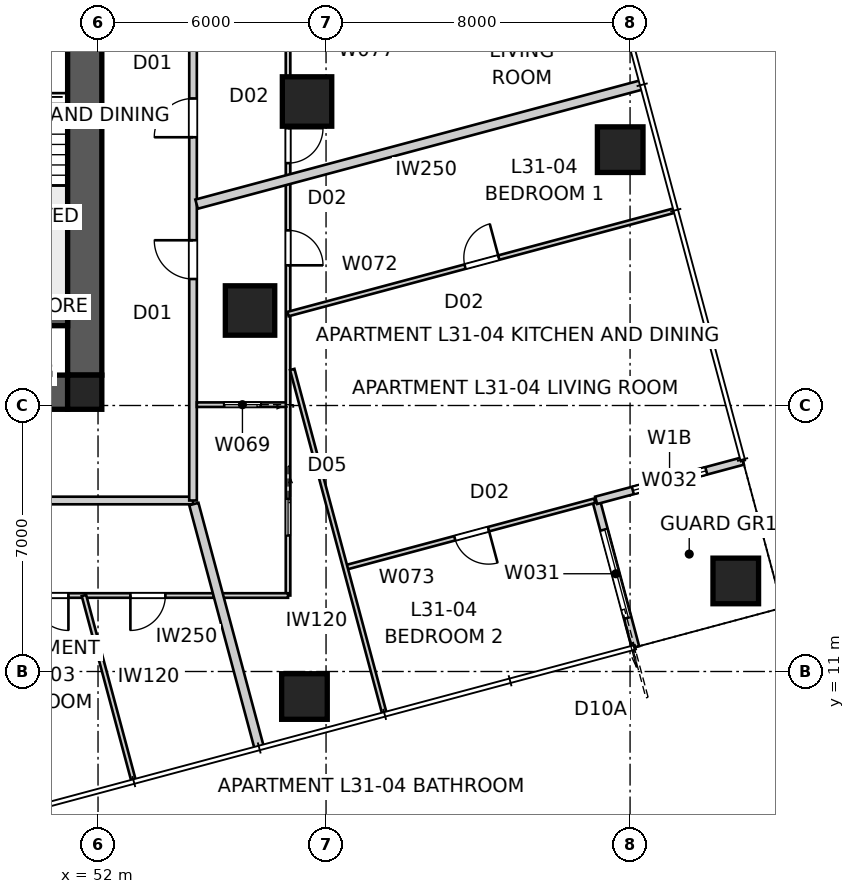
"""IFC4 building model, lengths in metres.
Left out: names, types, materials, properties, quantities, classifications, styles, units other than length and angle.
Written with IfcOpenShell. Run it as: python <this file> out.ifc"""

import sys

from ifc_helpers import new_model, si_unit, direction, frame, frame_2d, origin, origin_2d, place, context, subcontext, project, spatial, polyline, rectangle, outline, extrude, element, fill, save


model = new_model("IFC4")
c1 = context("Model", 3, precision=1e-05, world=origin(), true_north=direction((0.0, 1.0)))
c2 = subcontext(c1, "Body", "Model", "MODEL_VIEW")
j1 = project(units=[si_unit("LENGTHUNIT", "METRE"), si_unit("PLANEANGLEUNIT", "RADIAN")], contexts=[c1])
p1 = place(None, origin())
s1 = spatial("IfcSite", under=j1, at=p1, CompositionType="ELEMENT")
p2 = place(p1, origin())
s2 = spatial("IfcBuilding", under=s1, at=p2, CompositionType="ELEMENT")
p3 = place(p2, frame((0.0, 0.0, 115.0)))
s3 = spatial("IfcBuildingStorey", under=s2, at=p3, CompositionType="ELEMENT", Elevation=115.0)
p4 = place(p3, frame((51.2, 18.35, 0.0), z_axis=(0.0, 0.0, 1.0), x_axis=(-1.0, 0.0, 0.0)))
e1 = element("IfcWall", 1, at=p4, inside=s3, PredefinedType="SHEAR", context=c2, shape_type="SweptSolid", body=[
    extrude(outline(polyline([(0.0, -0.45), (22.4, -0.45), (22.4, -0.025), (22.85, -0.025), (22.85, 0.025), (22.4, 0.025), (22.4, 0.45), (0.0, 0.45), (0.0, 0.025), (-0.45, 0.025), (-0.45, -0.025), (0.0, -0.025), (0.0, -0.45)])), origin(), (0.0, 0.0, 1.0), 3.4),
])
p5 = place(p3, frame((51.65, 18.8, 0.0), z_axis=(0.0, 0.0, 1.0), x_axis=(0.0, 1.0, 0.0)))
e2 = element("IfcWall", 2, at=p5, inside=s3, PredefinedType="SHEAR", context=c2, shape_type="SweptSolid", body=[
    extrude(outline(polyline([(0.0, -0.45), (22.4, -0.45), (22.4, -0.025), (22.85, -0.025), (22.85, 0.025), (22.4, 0.025), (22.4, 0.45), (0.0, 0.45), (0.0, 0.025), (-0.45, 0.025), (-0.45, -0.025), (0.0, -0.025), (0.0, -0.45)])), origin(), (0.0, 0.0, 1.0), 3.4),
])
p6 = place(p5, frame((11.14, 0.0, 0.0)))
e3 = element("IfcOpeningElement", 3, at=p6, cuts=e2, PredefinedType="OPENING", context=c2, shape_type="SweptSolid", body=[
    extrude(rectangle(XDim=1.02, YDim=2.4, at=frame_2d((0.51, 1.2))), frame((0.0, 0.46, 0.0), z_axis=(0.0, -1.0, 0.0), x_axis=(1.0, 0.0, 0.0)), (0.0, 0.0, 1.0), 0.92),
])
p7 = place(p3, frame((51.2, 20.25, 0.0), z_axis=(0.0, 0.0, 1.0), x_axis=(-1.0, 0.0, 0.0)))
e4 = element("IfcWall", 4, at=p7, inside=s3, PredefinedType="SHEAR", context=c2, shape_type="SweptSolid", body=[
    extrude(rectangle(XDim=3.5, YDim=0.3, at=frame_2d((1.75, 0.0))), origin(), (0.0, 0.0, 1.0), 3.4),
])
p8 = place(p3, frame((51.65, 18.35, 0.0), z_axis=(0.0, 0.0, 1.0), x_axis=(1.0, 0.0, 0.0)))
e5 = element("IfcColumn", 5, at=p8, inside=s3, PredefinedType="COLUMN", context=c2, shape_type="SweptSolid", body=[
    extrude(rectangle(XDim=0.9, YDim=0.9, at=origin_2d()), origin(), (0.0, 0.0, 1.0), 3.4),
])
for number, where, z_axis, x_axis in (
    (6, (57.432, 10.342, 0.0), (0.0, 0.0, 1.0), (1.0, 0.0, 0.0)),
    (7, (68.781, 13.383, 0.0), (0.0, 0.0, 1.0), (1.0, 0.0, 0.0)),
    (8, (65.74, 24.733, 0.0), (0.0, 0.0, 1.0), (1.0, 0.0, 0.0)),
):
    element("IfcColumn", number, at=place(p3, frame(where, z_axis=z_axis, x_axis=x_axis)), inside=s3, PredefinedType="COLUMN", context=c2, shape_type="SweptSolid", body=[
        extrude(rectangle(XDim=1.2, YDim=1.2, at=origin_2d()), origin(), (0.0, 0.0, 1.0), 3.4),
    ])
for number, where, z_axis, x_axis in (
    (9, (57.5, 26.0, 0.0), (0.0, 0.0, 1.0), (1.0, 0.0, 0.0)),
    (10, (56.0, 20.5, 0.0), (0.0, 0.0, 1.0), (1.0, 0.0, 0.0)),
):
    element("IfcColumn", number, at=place(p3, frame(where, z_axis=z_axis, x_axis=x_axis)), inside=s3, PredefinedType="COLUMN", context=c2, shape_type="SweptSolid", body=[
        extrude(rectangle(XDim=1.3, YDim=1.3, at=origin_2d()), origin(), (0.0, 0.0, 1.0), 3.4),
    ])
p9 = place(p3, frame((66.143, 11.641, 0.0), z_axis=(0.0, 0.0, 1.0), x_axis=(-0.258843877716, 0.965919172068, 0.0)))
e11 = element("IfcWall", 11, at=p9, inside=s3, PredefinedType="SOLIDWALL", context=c2, shape_type="SweptSolid", body=[
    extrude(rectangle(XDim=4.0, YDim=0.2, at=frame_2d((2.0, 0.0))), origin(), (0.0, 0.0, 1.0), 3.25),
])
p10 = place(p9, frame((0.8, 0.0, 0.0)))
e12 = element("IfcOpeningElement", 12, at=p10, cuts=e11, PredefinedType="OPENING", context=c2, shape_type="SweptSolid", body=[
    extrude(rectangle(XDim=2.4, YDim=2.1, at=frame_2d((1.2, 1.05))), frame((0.0, 0.11, 0.0), z_axis=(0.0, -1.0, 0.0), x_axis=(1.0, 0.0, 0.0)), (0.0, 0.0, 1.0), 0.22),
])
p11 = place(p3, frame((65.107, 15.504, 0.0), z_axis=(0.0, 0.0, 1.0), x_axis=(0.965934430412, 0.258786931944, 0.0)))
e13 = element("IfcWall", 13, at=p11, inside=s3, PredefinedType="SOLIDWALL", context=c2, shape_type="SweptSolid", body=[
    extrude(rectangle(XDim=4.0, YDim=0.2, at=frame_2d((2.0, 0.0))), origin(), (0.0, 0.0, 1.0), 3.25),
])
p12 = place(p11, frame((1.0, 0.0, 0.45)))
e14 = element("IfcOpeningElement", 14, at=p12, cuts=e13, PredefinedType="OPENING", context=c2, shape_type="SweptSolid", body=[
    extrude(rectangle(XDim=2.0, YDim=1.8, at=frame_2d((1.0, 0.9))), frame((0.0, 0.11, 0.0), z_axis=(0.0, -1.0, 0.0), x_axis=(1.0, 0.0, 0.0)), (0.0, 0.0, 1.0), 0.22),
])
p13 = place(p3, frame((26.3, 15.5, 0.0), z_axis=(0.0, 0.0, 1.0), x_axis=(1.0, 0.0, 0.0)))
e15 = element("IfcWall", 15, at=p13, inside=s3, PredefinedType="PARTITIONING", context=c2, shape_type="SweptSolid", body=[
    extrude(rectangle(XDim=28.2, YDim=0.2, at=frame_2d((14.1, 0.0))), origin(), (0.0, 0.0, 1.0), 3.25),
])
p14 = place(p13, frame((21.474, 0.0, 0.0)))
e16 = element("IfcOpeningElement", 16, at=p14, cuts=e15, PredefinedType="OPENING", context=c2, shape_type="SweptSolid", body=[
    extrude(rectangle(XDim=1.02, YDim=2.34, at=frame_2d((0.51, 1.17))), frame((0.0, 0.11, 0.0), z_axis=(0.0, -1.0, 0.0), x_axis=(1.0, 0.0, 0.0)), (0.0, 0.0, 1.0), 0.22),
])
p15 = place(p13, frame((1.353, 0.0, 0.0)))
e17 = element("IfcOpeningElement", 17, at=p15, cuts=e15, PredefinedType="OPENING", context=c2, shape_type="SweptSolid", body=[
    extrude(rectangle(XDim=1.02, YDim=2.1, at=frame_2d((0.51, 1.05))), frame((0.0, 0.11, 0.0), z_axis=(0.0, -1.0, 0.0), x_axis=(1.0, 0.0, 0.0)), (0.0, 0.0, 1.0), 0.22),
])
p16 = place(p3, frame((54.5, 15.5, 0.0), z_axis=(0.0, 0.0, 1.0), x_axis=(0.0, 1.0, 0.0)))
e18 = element("IfcWall", 18, at=p16, inside=s3, PredefinedType="PARTITIONING", context=c2, shape_type="SweptSolid", body=[
    extrude(rectangle(XDim=29.0, YDim=0.2, at=frame_2d((14.5, 0.0))), origin(), (0.0, 0.0, 1.0), 3.25),
])
p17 = place(p16, frame((24.76, 0.0, 0.0)))
e19 = element("IfcOpeningElement", 19, at=p17, cuts=e18, PredefinedType="OPENING", context=c2, shape_type="SweptSolid", body=[
    extrude(rectangle(XDim=1.02, YDim=2.1, at=frame_2d((0.51, 1.05))), frame((0.0, 0.11, 0.0), z_axis=(0.0, -1.0, 0.0), x_axis=(1.0, 0.0, 0.0)), (0.0, 0.0, 1.0), 0.22),
])
p18 = place(p16, frame((5.829, 0.0, 0.0)))
e20 = element("IfcOpeningElement", 20, at=p18, cuts=e18, PredefinedType="OPENING", context=c2, shape_type="SweptSolid", body=[
    extrude(rectangle(XDim=1.02, YDim=2.34, at=frame_2d((0.51, 1.17))), frame((0.0, 0.11, 0.0), z_axis=(0.0, -1.0, 0.0), x_axis=(1.0, 0.0, 0.0)), (0.0, 0.0, 1.0), 0.22),
])
p19 = place(p16, frame((9.559, 0.0, 0.0)))
e21 = element("IfcOpeningElement", 21, at=p19, cuts=e18, PredefinedType="OPENING", context=c2, shape_type="SweptSolid", body=[
    extrude(rectangle(XDim=1.02, YDim=2.34, at=frame_2d((0.51, 1.17))), frame((0.0, 0.11, 0.0), z_axis=(0.0, -1.0, 0.0), x_axis=(1.0, 0.0, 0.0)), (0.0, 0.0, 1.0), 0.22),
])
p20 = place(p3, frame((56.242, 8.988, 0.0), z_axis=(0.0, 0.0, 1.0), x_axis=(-0.25880587229, 0.965929355837, 0.0)))
e22 = element("IfcWall", 22, at=p20, inside=s3, PredefinedType="PARTITIONING", context=c2, shape_type="SweptSolid", body=[
    extrude(rectangle(XDim=6.645, YDim=0.25, at=frame_2d((3.322, 0.0))), origin(), (0.0, 0.0, 1.0), 3.25),
])
p21 = place(p3, frame((66.318, 26.44, 0.0), z_axis=(0.0, 0.0, 1.0), x_axis=(-0.965924438766, -0.258824223352, 0.0)))
e23 = element("IfcWall", 23, at=p21, inside=s3, PredefinedType="PARTITIONING", context=c2, shape_type="SweptSolid", body=[
    extrude(rectangle(XDim=12.138, YDim=0.25, at=frame_2d((6.069, 0.0))), origin(), (0.0, 0.0, 1.0), 3.25),
])
p22 = place(p3, frame((55.046, 13.0, 0.0), z_axis=(0.0, 0.0, 1.0), x_axis=(-1.0, 0.0, 0.0)))
e24 = element("IfcWall", 24, at=p22, inside=s3, PredefinedType="PARTITIONING", context=c2, shape_type="SweptSolid", body=[
    extrude(rectangle(XDim=23.693, YDim=0.12, at=frame_2d((11.846, 0.0))), origin(), (0.0, 0.0, 1.0), 2.55),
])
p23 = place(p22, frame((8.262, 0.0, 0.0)))
e25 = element("IfcOpeningElement", 25, at=p23, cuts=e24, PredefinedType="OPENING", context=c2, shape_type="SweptSolid", body=[
    extrude(rectangle(XDim=0.92, YDim=2.34, at=frame_2d((0.46, 1.17))), frame((0.0, 0.07, 0.0), z_axis=(0.0, -1.0, 0.0), x_axis=(1.0, 0.0, 0.0)), (0.0, 0.0, 1.0), 0.14),
])
p24 = place(p22, frame((3.825, 0.0, 0.0)))
e26 = element("IfcOpeningElement", 26, at=p24, cuts=e24, PredefinedType="OPENING", context=c2, shape_type="SweptSolid", body=[
    extrude(rectangle(XDim=0.92, YDim=2.34, at=frame_2d((0.46, 1.17))), frame((0.0, 0.07, 0.0), z_axis=(0.0, -1.0, 0.0), x_axis=(1.0, 0.0, 0.0)), (0.0, 0.0, 1.0), 0.14),
])
p25 = place(p22, frame((1.274, 0.0, 0.0)))
e27 = element("IfcOpeningElement", 27, at=p25, cuts=e24, PredefinedType="OPENING", context=c2, shape_type="SweptSolid", body=[
    extrude(rectangle(XDim=0.92, YDim=2.34, at=frame_2d((0.46, 1.17))), frame((0.0, 0.07, 0.0), z_axis=(0.0, -1.0, 0.0), x_axis=(1.0, 0.0, 0.0)), (0.0, 0.0, 1.0), 0.14),
])
p26 = place(p22, frame((13.041, 0.0, 0.0)))
e28 = element("IfcOpeningElement", 28, at=p26, cuts=e24, PredefinedType="OPENING", context=c2, shape_type="SweptSolid", body=[
    extrude(rectangle(XDim=0.96, YDim=2.1, at=frame_2d((0.48, 1.05))), frame((0.0, 0.07, 0.0), z_axis=(0.0, -1.0, 0.0), x_axis=(1.0, 0.0, 0.0)), (0.0, 0.0, 1.0), 0.14),
])
p27 = place(p22, frame((21.917, 0.0, 0.0)))
e29 = element("IfcOpeningElement", 29, at=p27, cuts=e24, PredefinedType="OPENING", context=c2, shape_type="SweptSolid", body=[
    extrude(rectangle(XDim=0.96, YDim=2.1, at=frame_2d((0.48, 1.05))), frame((0.0, 0.07, 0.0), z_axis=(0.0, -1.0, 0.0), x_axis=(1.0, 0.0, 0.0)), (0.0, 0.0, 1.0), 0.14),
])
p28 = place(p3, frame((51.63, 13.0, 0.0), z_axis=(0.0, 0.0, 1.0), x_axis=(0.258789467631, -0.965933751063, 0.0)))
e30 = element("IfcWall", 30, at=p28, inside=s3, PredefinedType="PARTITIONING", context=c2, shape_type="SweptSolid", body=[
    extrude(rectangle(XDim=5.029, YDim=0.12, at=frame_2d((2.515, 0.0))), origin(), (0.0, 0.0, 1.0), 3.25),
])
p29 = place(p3, frame((57.0, 18.021, 0.0), z_axis=(0.0, 0.0, 1.0), x_axis=(-1.0, 0.0, 0.0)))
e31 = element("IfcWall", 31, at=p29, inside=s3, PredefinedType="PARTITIONING", context=c2, shape_type="SweptSolid", body=[
    extrude(rectangle(XDim=2.4, YDim=0.12, at=frame_2d((1.2, 0.0))), origin(), (0.0, 0.0, 1.0), 3.25),
])
p30 = place(p29, frame((0.72, 0.0, 0.0)))
e32 = element("IfcOpeningElement", 32, at=p30, cuts=e31, PredefinedType="OPENING", context=c2, shape_type="SweptSolid", body=[
    extrude(rectangle(XDim=0.96, YDim=2.1, at=frame_2d((0.48, 1.05))), frame((0.0, 0.07, 0.0), z_axis=(0.0, -1.0, 0.0), x_axis=(1.0, 0.0, 0.0)), (0.0, 0.0, 1.0), 0.14),
])
p31 = place(p3, frame((57.0, 47.0, 0.0), z_axis=(0.0, 0.0, 1.0), x_axis=(0.0, -1.0, 0.0)))
e33 = element("IfcWall", 33, at=p31, inside=s3, PredefinedType="PARTITIONING", context=c2, shape_type="SweptSolid", body=[
    extrude(rectangle(XDim=34.0, YDim=0.12, at=frame_2d((17.0, 0.0))), origin(), (0.0, 0.0, 1.0), 2.55),
])
p32 = place(p31, frame((8.23, 0.0, 0.0)))
e34 = element("IfcOpeningElement", 34, at=p32, cuts=e33, PredefinedType="OPENING", context=c2, shape_type="SweptSolid", body=[
    extrude(rectangle(XDim=0.92, YDim=2.34, at=frame_2d((0.46, 1.17))), frame((0.0, 0.07, 0.0), z_axis=(0.0, -1.0, 0.0), x_axis=(1.0, 0.0, 0.0)), (0.0, 0.0, 1.0), 0.14),
])
p33 = place(p31, frame((3.192, 0.0, 0.0)))
e35 = element("IfcOpeningElement", 35, at=p33, cuts=e33, PredefinedType="OPENING", context=c2, shape_type="SweptSolid", body=[
    extrude(rectangle(XDim=0.92, YDim=2.34, at=frame_2d((0.46, 1.17))), frame((0.0, 0.07, 0.0), z_axis=(0.0, -1.0, 0.0), x_axis=(1.0, 0.0, 0.0)), (0.0, 0.0, 1.0), 0.14),
])
p34 = place(p31, frame((24.391, 0.0, 0.0)))
e36 = element("IfcOpeningElement", 36, at=p34, cuts=e33, PredefinedType="OPENING", context=c2, shape_type="SweptSolid", body=[
    extrude(rectangle(XDim=0.92, YDim=2.34, at=frame_2d((0.46, 1.17))), frame((0.0, 0.07, 0.0), z_axis=(0.0, -1.0, 0.0), x_axis=(1.0, 0.0, 0.0)), (0.0, 0.0, 1.0), 0.14),
])
p35 = place(p31, frame((21.702, 0.0, 0.0)))
e37 = element("IfcOpeningElement", 37, at=p35, cuts=e33, PredefinedType="OPENING", context=c2, shape_type="SweptSolid", body=[
    extrude(rectangle(XDim=0.92, YDim=2.34, at=frame_2d((0.46, 1.17))), frame((0.0, 0.07, 0.0), z_axis=(0.0, -1.0, 0.0), x_axis=(1.0, 0.0, 0.0)), (0.0, 0.0, 1.0), 0.14),
])
p36 = place(p31, frame((31.459, 0.0, 0.0)))
e38 = element("IfcOpeningElement", 38, at=p36, cuts=e33, PredefinedType="OPENING", context=c2, shape_type="SweptSolid", body=[
    extrude(rectangle(XDim=0.96, YDim=2.1, at=frame_2d((0.48, 1.05))), frame((0.0, 0.07, 0.0), z_axis=(0.0, -1.0, 0.0), x_axis=(1.0, 0.0, 0.0)), (0.0, 0.0, 1.0), 0.14),
])
p37 = place(p31, frame((13.759, 0.0, 0.0)))
e39 = element("IfcOpeningElement", 39, at=p37, cuts=e33, PredefinedType="OPENING", context=c2, shape_type="SweptSolid", body=[
    extrude(rectangle(XDim=0.96, YDim=2.1, at=frame_2d((0.48, 1.05))), frame((0.0, 0.07, 0.0), z_axis=(0.0, -1.0, 0.0), x_axis=(1.0, 0.0, 0.0)), (0.0, 0.0, 1.0), 0.14),
])
p38 = place(p3, frame((57.0, 13.0, 0.0), z_axis=(0.0, 0.0, 1.0), x_axis=(-1.0, 0.0, 0.0)))
e40 = element("IfcWall", 40, at=p38, inside=s3, PredefinedType="PARTITIONING", context=c2, shape_type="SweptSolid", body=[
    extrude(rectangle(XDim=1.833, YDim=0.12, at=frame_2d((0.917, 0.0))), origin(), (0.0, 0.0, 1.0), 3.25),
])
p39 = place(p3, frame((57.0, 20.406, 0.0), z_axis=(0.0, 0.0, 1.0), x_axis=(0.9659257847, 0.258819200315, 0.0)))
e41 = element("IfcWall", 41, at=p39, inside=s3, PredefinedType="PARTITIONING", context=c2, shape_type="SweptSolid", body=[
    extrude(rectangle(XDim=10.522, YDim=0.12, at=frame_2d((5.261, 0.0))), origin(), (0.0, 0.0, 1.0), 2.722),
])
p40 = place(p39, frame((4.821, 0.0, 0.0)))
e42 = element("IfcOpeningElement", 42, at=p40, cuts=e41, PredefinedType="OPENING", context=c2, shape_type="SweptSolid", body=[
    extrude(rectangle(XDim=0.92, YDim=2.34, at=frame_2d((0.46, 1.17))), frame((0.0, 0.07, 0.0), z_axis=(0.0, -1.0, 0.0), x_axis=(1.0, 0.0, 0.0)), (0.0, 0.0, 1.0), 0.14),
])
p41 = place(p3, frame((65.069, 15.494, 0.0), z_axis=(0.0, 0.0, 1.0), x_axis=(-0.965922865286, -0.258830095464, 0.0)))
e43 = element("IfcWall", 43, at=p41, inside=s3, PredefinedType="PARTITIONING", context=c2, shape_type="SweptSolid", body=[
    extrude(rectangle(XDim=6.793, YDim=0.12, at=frame_2d((3.396, 0.0))), origin(), (0.0, 0.0, 1.0), 3.25),
])
p42 = place(p41, frame((2.892, 0.0, 0.0)))
e44 = element("IfcOpeningElement", 44, at=p42, cuts=e43, PredefinedType="OPENING", context=c2, shape_type="SweptSolid", body=[
    extrude(rectangle(XDim=0.92, YDim=2.34, at=frame_2d((0.46, 1.17))), frame((0.0, 0.07, 0.0), z_axis=(0.0, -1.0, 0.0), x_axis=(1.0, 0.0, 0.0)), (0.0, 0.0, 1.0), 0.14),
])
p43 = place(p3, frame((59.532, 9.911, 0.0), z_axis=(0.0, 0.0, 1.0), x_axis=(-0.25881390457, 0.965927203676, 0.0)))
e45 = element("IfcWall", 45, at=p43, inside=s3, PredefinedType="PARTITIONING", context=c2, shape_type="SweptSolid", body=[
    extrude(rectangle(XDim=9.357, YDim=0.12, at=frame_2d((4.678, 0.0))), origin(), (0.0, 0.0, 1.0), 2.638),
])
p44 = place(p10, origin())
e46 = element("IfcDoor", 46, at=p44, inside=s3, OperationType="SLIDING_TO_LEFT", PredefinedType="DOOR", context=c2, shape_type="SweptSolid", body=[
    extrude(rectangle(XDim=2.4, YDim=2.1, at=frame_2d((1.2, 1.05))), frame((0.0, 0.025, 0.0), z_axis=(0.0, -1.0, 0.0), x_axis=(1.0, 0.0, 0.0)), (0.0, 0.0, 1.0), 0.05),
])
fill(e12, e46)
p45 = place(p12, origin())
e47 = element("IfcWindow", 47, at=p45, inside=s3, PartitioningType="SINGLE_PANEL", PredefinedType="WINDOW", context=c2, shape_type="SweptSolid", body=[
    extrude(rectangle(XDim=2.0, YDim=1.8, at=frame_2d((1.0, 0.9))), frame((0.0, 0.03, 0.0), z_axis=(0.0, -1.0, 0.0), x_axis=(1.0, 0.0, 0.0)), (0.0, 0.0, 1.0), 0.06),
])
fill(e14, e47)
p46 = place(p18, origin())
e48 = element("IfcDoor", 48, at=p46, inside=s3, OperationType="SINGLE_SWING_RIGHT", PredefinedType="DOOR", context=c2, shape_type="SweptSolid", body=[
    extrude(rectangle(XDim=1.02, YDim=2.34, at=frame_2d((0.51, 1.17))), frame((0.0, 0.025, 0.0), z_axis=(0.0, -1.0, 0.0), x_axis=(1.0, 0.0, 0.0)), (0.0, 0.0, 1.0), 0.05),
])
fill(e20, e48)
p47 = place(p19, origin())
e49 = element("IfcDoor", 49, at=p47, inside=s3, OperationType="SINGLE_SWING_LEFT", PredefinedType="DOOR", context=c2, shape_type="SweptSolid", body=[
    extrude(rectangle(XDim=1.02, YDim=2.34, at=frame_2d((0.51, 1.17))), frame((0.0, 0.025, 0.0), z_axis=(0.0, -1.0, 0.0), x_axis=(1.0, 0.0, 0.0)), (0.0, 0.0, 1.0), 0.05),
])
fill(e21, e49)
p48 = place(p24, origin())
e50 = element("IfcDoor", 50, at=p48, inside=s3, OperationType="SINGLE_SWING_LEFT", PredefinedType="DOOR", context=c2, shape_type="SweptSolid", body=[
    extrude(rectangle(XDim=0.92, YDim=2.34, at=frame_2d((0.46, 1.17))), frame((0.0, 0.025, 0.0), z_axis=(0.0, -1.0, 0.0), x_axis=(1.0, 0.0, 0.0)), (0.0, 0.0, 1.0), 0.05),
])
fill(e26, e50)
p49 = place(p25, origin())
e51 = element("IfcDoor", 51, at=p49, inside=s3, OperationType="SINGLE_SWING_RIGHT", PredefinedType="DOOR", context=c2, shape_type="SweptSolid", body=[
    extrude(rectangle(XDim=0.92, YDim=2.34, at=frame_2d((0.46, 1.17))), frame((0.0, 0.025, 0.0), z_axis=(0.0, -1.0, 0.0), x_axis=(1.0, 0.0, 0.0)), (0.0, 0.0, 1.0), 0.05),
])
fill(e27, e51)
p50 = place(p34, origin())
e52 = element("IfcDoor", 52, at=p50, inside=s3, OperationType="SINGLE_SWING_RIGHT", PredefinedType="DOOR", context=c2, shape_type="SweptSolid", body=[
    extrude(rectangle(XDim=0.92, YDim=2.34, at=frame_2d((0.46, 1.17))), frame((0.0, 0.025, 0.0), z_axis=(0.0, -1.0, 0.0), x_axis=(1.0, 0.0, 0.0)), (0.0, 0.0, 1.0), 0.05),
])
fill(e36, e52)
p51 = place(p30, origin())
e53 = element("IfcDoor", 53, at=p51, inside=s3, OperationType="SLIDING_TO_LEFT", PredefinedType="DOOR", context=c2, shape_type="SweptSolid", body=[
    extrude(rectangle(XDim=0.96, YDim=2.1, at=frame_2d((0.48, 1.05))), frame((0.0, 0.025, 0.0), z_axis=(0.0, -1.0, 0.0), x_axis=(1.0, 0.0, 0.0)), (0.0, 0.0, 1.0), 0.05),
])
fill(e32, e53)
p52 = place(p35, origin())
e54 = element("IfcDoor", 54, at=p52, inside=s3, OperationType="SINGLE_SWING_LEFT", PredefinedType="DOOR", context=c2, shape_type="SweptSolid", body=[
    extrude(rectangle(XDim=0.92, YDim=2.34, at=frame_2d((0.46, 1.17))), frame((0.0, 0.025, 0.0), z_axis=(0.0, -1.0, 0.0), x_axis=(1.0, 0.0, 0.0)), (0.0, 0.0, 1.0), 0.05),
])
fill(e37, e54)
p53 = place(p36, origin())
e55 = element("IfcDoor", 55, at=p53, inside=s3, OperationType="SLIDING_TO_LEFT", PredefinedType="DOOR", context=c2, shape_type="SweptSolid", body=[
    extrude(rectangle(XDim=0.96, YDim=2.1, at=frame_2d((0.48, 1.05))), frame((0.0, 0.025, 0.0), z_axis=(0.0, -1.0, 0.0), x_axis=(1.0, 0.0, 0.0)), (0.0, 0.0, 1.0), 0.05),
])
fill(e38, e55)
p54 = place(p40, origin())
e56 = element("IfcDoor", 56, at=p54, inside=s3, OperationType="SINGLE_SWING_RIGHT", PredefinedType="DOOR", context=c2, shape_type="SweptSolid", body=[
    extrude(rectangle(XDim=0.92, YDim=2.34, at=frame_2d((0.46, 1.17))), frame((0.0, 0.025, 0.0), z_axis=(0.0, -1.0, 0.0), x_axis=(1.0, 0.0, 0.0)), (0.0, 0.0, 1.0), 0.05),
])
fill(e42, e56)
p55 = place(p42, origin())
e57 = element("IfcDoor", 57, at=p55, inside=s3, OperationType="SINGLE_SWING_LEFT", PredefinedType="DOOR", context=c2, shape_type="SweptSolid", body=[
    extrude(rectangle(XDim=0.92, YDim=2.34, at=frame_2d((0.46, 1.17))), frame((0.0, 0.025, 0.0), z_axis=(0.0, -1.0, 0.0), x_axis=(1.0, 0.0, 0.0)), (0.0, 0.0, 1.0), 0.05),
])
fill(e44, e57)
save(model, sys.argv[1])
